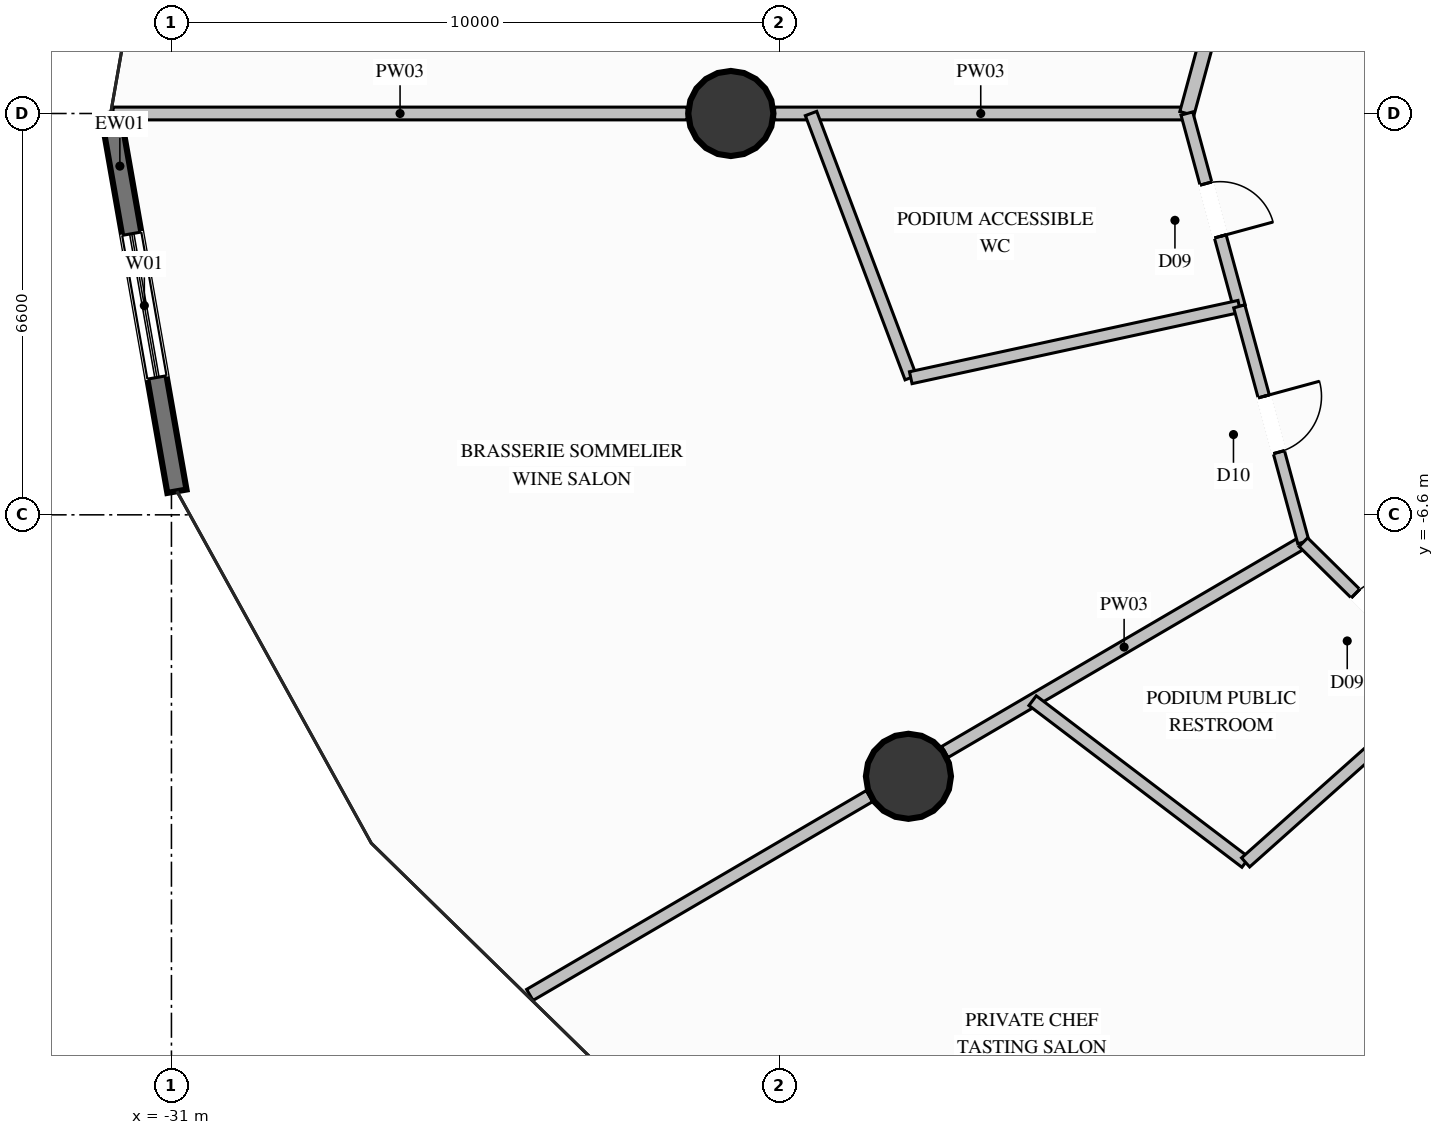
"""IFC4 building model, lengths in metres.
Left out: names, types, materials, properties, quantities, classifications, styles, units other than length and angle.
Written with IfcOpenShell. Run it as: python <this file> out.ifc"""

import sys

from ifc_helpers import new_model, si_unit, direction, frame, frame_2d, origin, origin_2d, place, context, subcontext, project, spatial, rectangle, circle, extrude, element, fill, save


model = new_model("IFC4")
c1 = context("Model", 3, precision=1e-05, world=origin(), true_north=direction((0.0, 1.0)))
c2 = subcontext(c1, "Body", "Model", "MODEL_VIEW")
j1 = project(units=[si_unit("LENGTHUNIT", "METRE"), si_unit("PLANEANGLEUNIT", "RADIAN")], contexts=[c1])
p1 = place(None, origin())
s1 = spatial("IfcSite", under=j1, at=p1, CompositionType="ELEMENT")
p2 = place(p1, origin())
s2 = spatial("IfcBuilding", under=s1, at=p2, CompositionType="ELEMENT")
p3 = place(p2, frame((0.0, 0.0, 7.2)))
s3 = spatial("IfcBuildingStorey", under=s2, at=p3, CompositionType="ELEMENT", Elevation=7.2)
for number, where, z_axis, x_axis in (
    (1, (-21.8, 0.0, 0.0), (0.0, 0.0, 1.0), (1.0, 0.0, 0.0)),
    (2, (-18.879, -10.9, 0.0), (0.0, 0.0, 1.0), (1.0, 0.0, 0.0)),
):
    element("IfcColumn", number, at=place(p3, frame(where, z_axis=z_axis, x_axis=x_axis)), inside=s3, PredefinedType="COLUMN", context=c2, shape_type="SweptSolid", body=[
        extrude(circle(Radius=0.7, at=origin_2d()), origin(), (0.0, 0.0, 1.0), 5.4),
    ])
p4 = place(p3, frame((-30.91, -6.212, 0.0), z_axis=(0.0, 0.0, 1.0), x_axis=(-0.172842303266, 0.984949510483, 0.0)))
e3 = element("IfcWall", 3, at=p4, inside=s3, PredefinedType="SOLIDWALL", context=c2, shape_type="SweptSolid", body=[
    extrude(rectangle(XDim=6.307, YDim=0.32, at=frame_2d((3.153, 0.0))), origin(), (0.0, 0.0, 1.0), 4.98),
])
p5 = place(p4, frame((1.9, 0.0, 0.65)))
e4 = element("IfcOpeningElement", 4, at=p5, cuts=e3, PredefinedType="OPENING", context=c2, shape_type="SweptSolid", body=[
    extrude(rectangle(XDim=2.4, YDim=3.2, at=frame_2d((1.2, 1.6))), frame((0.0, 0.17, 0.0), z_axis=(0.0, -1.0, 0.0), x_axis=(1.0, 0.0, 0.0)), (0.0, 0.0, 1.0), 0.34),
])
p6 = place(p3, frame((-14.3, 0.0, 0.0), z_axis=(0.0, 0.0, 1.0), x_axis=(-1.0, 0.0, 0.0)))
e5 = element("IfcWall", 5, at=p6, inside=s3, PredefinedType="PARTITIONING", context=c2, shape_type="SweptSolid", body=[
    extrude(rectangle(XDim=6.78, YDim=0.21, at=frame_2d((3.39, 0.0))), origin(), (0.0, 0.0, 1.0), 4.191),
])
p7 = place(p3, frame((-22.52, 0.0, 0.0), z_axis=(0.0, 0.0, 1.0), x_axis=(-1.0, 0.0, 0.0)))
e6 = element("IfcWall", 6, at=p7, inside=s3, PredefinedType="PARTITIONING", context=c2, shape_type="SweptSolid", body=[
    extrude(rectangle(XDim=9.44, YDim=0.21, at=frame_2d((4.72, 0.0))), origin(), (0.0, 0.0, 1.0), 4.98),
])
p8 = place(p3, frame((-12.384, -7.05, 0.0), z_axis=(0.0, 0.0, 1.0), x_axis=(-0.863101484719, -0.505030520934, 0.0)))
e7 = element("IfcWall", 7, at=p8, inside=s3, PredefinedType="PARTITIONING", context=c2, shape_type="SweptSolid", body=[
    extrude(rectangle(XDim=6.831, YDim=0.21, at=frame_2d((3.416, 0.0))), origin(), (0.0, 0.0, 1.0), 4.191),
])
p9 = place(p3, frame((-19.521, -11.226, 0.0), z_axis=(0.0, 0.0, 1.0), x_axis=(-0.863028108689, -0.505155900304, 0.0)))
e8 = element("IfcWall", 8, at=p9, inside=s3, PredefinedType="PARTITIONING", context=c2, shape_type="SweptSolid", body=[
    extrude(rectangle(XDim=6.471, YDim=0.21, at=frame_2d((3.236, 0.0))), origin(), (0.0, 0.0, 1.0), 4.98),
])
p10 = place(p3, frame((-12.384, 7.05, 0.0), z_axis=(0.0, 0.0, 1.0), x_axis=(-0.262260528785, -0.964997106235, 0.0)))
e9 = element("IfcWall", 9, at=p10, inside=s3, PredefinedType="PARTITIONING", context=c2, shape_type="SweptSolid", body=[
    extrude(rectangle(XDim=7.306, YDim=0.24, at=frame_2d((3.653, 0.0))), origin(), (0.0, 0.0, 1.0), 4.98),
])
p11 = place(p3, frame((-14.3, 0.0, 0.0), z_axis=(0.0, 0.0, 1.0), x_axis=(0.262250045558, -0.964999955236, 0.0)))
e10 = element("IfcWall", 10, at=p11, inside=s3, PredefinedType="PLUMBINGWALL", context=c2, shape_type="SweptSolid", body=[
    extrude(rectangle(XDim=3.287, YDim=0.2, at=frame_2d((1.644, 0.0))), origin(), (0.0, 0.0, 1.0), 4.98),
])
p12 = place(p11, frame((1.194, 0.0, 0.0)))
e11 = element("IfcOpeningElement", 11, at=p12, cuts=e10, PredefinedType="OPENING", context=c2, shape_type="SweptSolid", body=[
    extrude(rectangle(XDim=0.9, YDim=2.1, at=frame_2d((0.45, 1.05))), frame((0.0, 0.11, 0.0), z_axis=(0.0, -1.0, 0.0), x_axis=(1.0, 0.0, 0.0)), (0.0, 0.0, 1.0), 0.22),
])
p13 = place(p3, frame((-20.481, 0.0, 0.0), z_axis=(0.0, 0.0, 1.0), x_axis=(0.353110214666, -0.93558173149, 0.0)))
e12 = element("IfcWall", 12, at=p13, inside=s3, PredefinedType="PLUMBINGWALL", context=c2, shape_type="SweptSolid", body=[
    extrude(rectangle(XDim=4.644, YDim=0.2, at=frame_2d((2.322, 0.0))), origin(), (0.0, 0.0, 1.0), 4.98),
])
p14 = place(p3, frame((-13.438, -3.172, 0.0), z_axis=(0.0, 0.0, 1.0), x_axis=(-0.977241278622, -0.212130816615, 0.0)))
e13 = element("IfcWall", 13, at=p14, inside=s3, PredefinedType="PLUMBINGWALL", context=c2, shape_type="SweptSolid", body=[
    extrude(rectangle(XDim=5.529, YDim=0.2, at=frame_2d((2.764, 0.0))), origin(), (0.0, 0.0, 1.0), 4.98),
])
p15 = place(p3, frame((-13.438, -3.172, 0.0), z_axis=(0.0, 0.0, 1.0), x_axis=(0.262269103922, -0.9649947757, 0.0)))
e14 = element("IfcWall", 14, at=p15, inside=s3, PredefinedType="PARTITIONING", context=c2, shape_type="SweptSolid", body=[
    extrude(rectangle(XDim=4.019, YDim=0.19, at=frame_2d((2.009, 0.0))), origin(), (0.0, 0.0, 1.0), 4.98),
])
p16 = place(p15, frame((1.534, 0.0, 0.0)))
e15 = element("IfcOpeningElement", 15, at=p16, cuts=e14, PredefinedType="OPENING", context=c2, shape_type="SweptSolid", body=[
    extrude(rectangle(XDim=0.95, YDim=2.1, at=frame_2d((0.475, 1.05))), frame((0.0, 0.105, 0.0), z_axis=(0.0, -1.0, 0.0), x_axis=(1.0, 0.0, 0.0)), (0.0, 0.0, 1.0), 0.21),
])
p17 = place(p3, frame((-12.384, -7.05, 0.0), z_axis=(0.0, 0.0, 1.0), x_axis=(0.712072104827, -0.70210634346, 0.0)))
e16 = element("IfcWall", 16, at=p17, inside=s3, PredefinedType="PLUMBINGWALL", context=c2, shape_type="SweptSolid", body=[
    extrude(rectangle(XDim=3.307, YDim=0.2, at=frame_2d((1.654, 0.0))), origin(), (0.0, 0.0, 1.0), 4.98),
])
p18 = place(p17, frame((1.204, 0.0, 0.0)))
e17 = element("IfcOpeningElement", 17, at=p18, cuts=e16, PredefinedType="OPENING", context=c2, shape_type="SweptSolid", body=[
    extrude(rectangle(XDim=0.9, YDim=2.1, at=frame_2d((0.45, 1.05))), frame((0.0, 0.11, 0.0), z_axis=(0.0, -1.0, 0.0), x_axis=(1.0, 0.0, 0.0)), (0.0, 0.0, 1.0), 0.22),
])
p19 = place(p3, frame((-16.837, -9.656, 0.0), z_axis=(0.0, 0.0, 1.0), x_axis=(0.79641562161, -0.60474966528, 0.0)))
e18 = element("IfcWall", 18, at=p19, inside=s3, PredefinedType="PLUMBINGWALL", context=c2, shape_type="SweptSolid", body=[
    extrude(rectangle(XDim=4.398, YDim=0.2, at=frame_2d((2.199, 0.0))), origin(), (0.0, 0.0, 1.0), 4.98),
])
p20 = place(p3, frame((-10.029, -9.372, 0.0), z_axis=(0.0, 0.0, 1.0), x_axis=(-0.746721111404, -0.66513726537, 0.0)))
e19 = element("IfcWall", 19, at=p20, inside=s3, PredefinedType="PLUMBINGWALL", context=c2, shape_type="SweptSolid", body=[
    extrude(rectangle(XDim=4.426, YDim=0.2, at=frame_2d((2.213, 0.0))), origin(), (0.0, 0.0, 1.0), 4.98),
])
p21 = place(p5, origin())
e20 = element("IfcWindow", 20, at=p21, inside=s3, PartitioningType="SINGLE_PANEL", PredefinedType="WINDOW", context=c2, shape_type="SweptSolid", body=[
    extrude(rectangle(XDim=2.4, YDim=3.2, at=frame_2d((1.2, 1.6))), frame((0.0, 0.03, 0.0), z_axis=(0.0, -1.0, 0.0), x_axis=(1.0, 0.0, 0.0)), (0.0, 0.0, 1.0), 0.06),
])
fill(e4, e20)
p22 = place(p12, origin())
e21 = element("IfcDoor", 21, at=p22, inside=s3, OperationType="SINGLE_SWING_RIGHT", PredefinedType="DOOR", context=c2, shape_type="SweptSolid", body=[
    extrude(rectangle(XDim=0.9, YDim=2.1, at=frame_2d((0.45, 1.05))), frame((0.0, 0.025, 0.0), z_axis=(0.0, -1.0, 0.0), x_axis=(1.0, 0.0, 0.0)), (0.0, 0.0, 1.0), 0.05),
])
fill(e11, e21)
p23 = place(p16, origin())
e22 = element("IfcDoor", 22, at=p23, inside=s3, OperationType="SINGLE_SWING_LEFT", PredefinedType="DOOR", context=c2, shape_type="SweptSolid", body=[
    extrude(rectangle(XDim=0.95, YDim=2.1, at=frame_2d((0.475, 1.05))), frame((0.0, 0.025, 0.0), z_axis=(0.0, -1.0, 0.0), x_axis=(1.0, 0.0, 0.0)), (0.0, 0.0, 1.0), 0.05),
])
fill(e15, e22)
p24 = place(p18, origin())
e23 = element("IfcDoor", 23, at=p24, inside=s3, OperationType="SINGLE_SWING_RIGHT", PredefinedType="DOOR", context=c2, shape_type="SweptSolid", body=[
    extrude(rectangle(XDim=0.9, YDim=2.1, at=frame_2d((0.45, 1.05))), frame((0.0, 0.025, 0.0), z_axis=(0.0, -1.0, 0.0), x_axis=(1.0, 0.0, 0.0)), (0.0, 0.0, 1.0), 0.05),
])
fill(e17, e23)
save(model, sys.argv[1])
